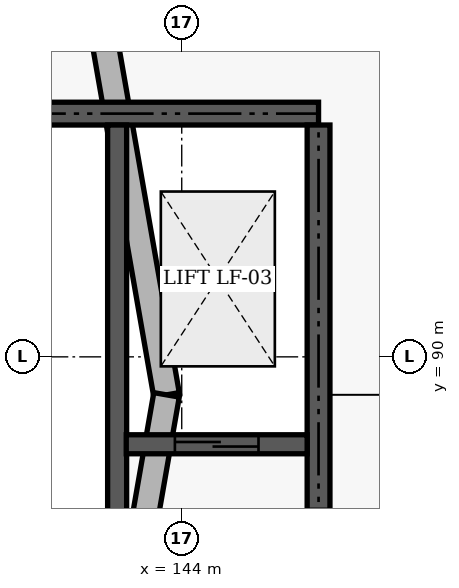
"""IFC4 building model, lengths in metres.
Left out: names, types, materials, properties, quantities, classifications, styles, units other than length and angle.
Written with IfcOpenShell. Run it as: python <this file> out.ifc"""

import sys

from ifc_helpers import new_model, si_unit, direction, frame, frame_2d, origin, place, context, subcontext, project, spatial, rectangle, extrude, element, fill, save


model = new_model("IFC4")
c1 = context("Model", 3, precision=1e-05, world=origin(), true_north=direction((0.0, 1.0)))
c2 = subcontext(c1, "Body", "Model", "MODEL_VIEW")
j1 = project(units=[si_unit("LENGTHUNIT", "METRE"), si_unit("PLANEANGLEUNIT", "RADIAN")], contexts=[c1])
p1 = place(None, origin())
s1 = spatial("IfcSite", under=j1, at=p1, CompositionType="ELEMENT")
p2 = place(p1, origin())
s2 = spatial("IfcBuilding", under=s1, at=p2, CompositionType="ELEMENT")
p3 = place(p2, frame((0.0, 0.0, 9.6)))
s3 = spatial("IfcBuildingStorey", under=s2, at=p3, CompositionType="ELEMENT", Elevation=9.6)
for number, where, z_axis, x_axis in (
    (1, (143.8, 89.5, 4.53), (0.0, 0.0, 1.0), (-0.172, 0.985, 0.0)),
    (2, (142.273, 80.752, 4.53), (0.0, 0.0, 1.0), (0.172, 0.985, 0.0)),
):
    element("IfcWall", number, at=place(p3, frame(where, z_axis=z_axis, x_axis=x_axis)), inside=s3, PredefinedType="SOLIDWALL", context=c2, shape_type="SweptSolid", body=[
        extrude(rectangle(XDim=8.88, YDim=0.34, at=frame_2d((4.44, 0.0))), origin(), (0.0, 0.0, 1.0), 3.02),
    ])
p4 = place(p3, frame((139.2, 93.2, 0.0), z_axis=(0.0, 0.0, 1.0), x_axis=(1.0, 0.0, 0.0)))
e3 = element("IfcWall", 3, at=p4, inside=s3, PredefinedType="SHEAR", context=c2, shape_type="SweptSolid", body=[
    extrude(rectangle(XDim=6.6, YDim=0.3, at=frame_2d((3.3, 0.0))), origin(), (0.0, 0.0, 1.0), 3.4),
])
p5 = place(p3, frame((145.8, 85.95, 0.0), z_axis=(0.0, 0.0, 1.0), x_axis=(0.0, 1.0, 0.0)))
e4 = element("IfcWall", 4, at=p5, inside=s3, PredefinedType="SHEAR", context=c2, shape_type="SweptSolid", body=[
    extrude(rectangle(XDim=7.1, YDim=0.3, at=frame_2d((3.55, 0.0))), origin(), (0.0, 0.0, 1.0), 3.4),
])
p6 = place(p5, frame((0.75, 0.0, 0.0)))
e5 = element("IfcOpeningElement", 5, at=p6, cuts=e4, PredefinedType="OPENING", context=c2, shape_type="SweptSolid", body=[
    extrude(rectangle(XDim=1.3, YDim=2.15, at=frame_2d((0.65, 1.075))), frame((0.0, 0.16, 0.0), z_axis=(0.0, -1.0, 0.0), x_axis=(1.0, 0.0, 0.0)), (0.0, 0.0, 1.0), 0.32),
])
p7 = place(p3, frame((143.15, 85.95, 0.0), z_axis=(0.0, 0.0, 1.0), x_axis=(0.0, 1.0, 0.0)))
e6 = element("IfcWall", 6, at=p7, inside=s3, PredefinedType="SHEAR", context=c2, shape_type="SweptSolid", body=[
    extrude(rectangle(XDim=7.1, YDim=0.25, at=frame_2d((3.55, 0.0))), origin(), (0.0, 0.0, 1.0), 3.4),
])
p8 = place(p7, frame((0.2, 0.0, 0.0)))
e7 = element("IfcOpeningElement", 7, at=p8, cuts=e6, PredefinedType="OPENING", context=c2, shape_type="SweptSolid", body=[
    extrude(rectangle(XDim=1.15, YDim=2.15, at=frame_2d((0.575, 1.075))), frame((0.0, 0.135, 0.0), z_axis=(0.0, -1.0, 0.0), x_axis=(1.0, 0.0, 0.0)), (0.0, 0.0, 1.0), 0.27),
])
p9 = place(p3, frame((143.27, 88.85, 0.0), z_axis=(0.0, 0.0, 1.0), x_axis=(1.0, 0.0, 0.0)))
e8 = element("IfcWall", 8, at=p9, inside=s3, PredefinedType="SHEAR", context=c2, shape_type="SweptSolid", body=[
    extrude(rectangle(XDim=2.38, YDim=0.25, at=frame_2d((1.19, 0.0))), origin(), (0.0, 0.0, 1.0), 3.4),
])
p10 = place(p9, frame((0.64, 0.0, 0.0)))
e9 = element("IfcOpeningElement", 9, at=p10, cuts=e8, PredefinedType="OPENING", context=c2, shape_type="SweptSolid", body=[
    extrude(rectangle(XDim=1.1, YDim=2.15, at=frame_2d((0.55, 1.075))), frame((0.0, 0.135, 0.0), z_axis=(0.0, -1.0, 0.0), x_axis=(1.0, 0.0, 0.0)), (0.0, 0.0, 1.0), 0.27),
])
p11 = place(p6, frame((1.3, 0.0, 0.0), z_axis=(0.0, 0.0, 1.0), x_axis=(-1.0, 0.0, 0.0)))
e10 = element("IfcDoor", 10, at=p11, inside=s3, OperationType="DOUBLE_DOOR_SINGLE_SWING", PredefinedType="DOOR", context=c2, shape_type="SweptSolid", body=[
    extrude(rectangle(XDim=1.3, YDim=2.15, at=frame_2d((0.65, 1.075))), frame((0.0, 0.025, 0.0), z_axis=(0.0, -1.0, 0.0), x_axis=(1.0, 0.0, 0.0)), (0.0, 0.0, 1.0), 0.05),
])
fill(e5, e10)
p12 = place(p10, origin())
e11 = element("IfcDoor", 11, at=p12, inside=s3, OperationType="SLIDING_TO_LEFT", PredefinedType="DOOR", context=c2, shape_type="SweptSolid", body=[
    extrude(rectangle(XDim=1.1, YDim=2.15, at=frame_2d((0.55, 1.075))), frame((0.0, 0.025, 0.0), z_axis=(0.0, -1.0, 0.0), x_axis=(1.0, 0.0, 0.0)), (0.0, 0.0, 1.0), 0.05),
])
fill(e9, e11)
save(model, sys.argv[1])
